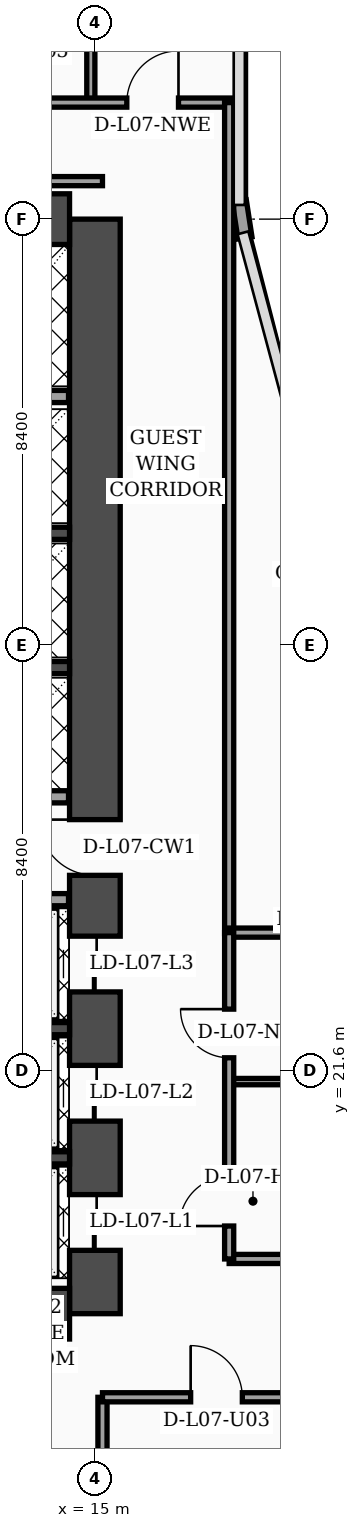
"""IFC4 building model, lengths in metres.
Left out: names, types, materials, properties, quantities, classifications, styles, units other than length and angle.
Written with IfcOpenShell. Run it as: python <this file> out.ifc"""

import sys

from ifc_helpers import new_model, si_unit, direction, frame, frame_2d, origin, place, context, subcontext, project, spatial, rectangle, extrude, element, fill, save


model = new_model("IFC4")
c1 = context("Model", 3, precision=1e-05, world=origin(), true_north=direction((0.0, 1.0)))
c2 = subcontext(c1, "Body", "Model", "MODEL_VIEW")
j1 = project(units=[si_unit("LENGTHUNIT", "METRE"), si_unit("PLANEANGLEUNIT", "RADIAN")], contexts=[c1])
p1 = place(None, origin())
s1 = spatial("IfcSite", under=j1, at=p1, CompositionType="ELEMENT")
p2 = place(p1, origin())
s2 = spatial("IfcBuilding", under=s1, at=p2, CompositionType="ELEMENT")
p3 = place(p2, frame((0.0, 0.0, 34.6)))
s3 = spatial("IfcBuildingStorey", under=s2, at=p3, CompositionType="ELEMENT", Elevation=34.6)
p4 = place(p3, frame((15.0, 16.8, 0.0), z_axis=(0.0, 0.0, 1.0), x_axis=(0.0, 1.0, 0.0)))
e1 = element("IfcWall", 1, at=p4, inside=s3, PredefinedType="SHEAR", context=c2, shape_type="SweptSolid", body=[
    extrude(rectangle(XDim=21.6, YDim=1.0, at=frame_2d((10.8, 0.0))), origin(), (0.0, 0.0, 1.0), 3.56),
])
p5 = place(p4, frame((8.65, 0.0, 0.0)))
e2 = element("IfcOpeningElement", 2, at=p5, cuts=e1, PredefinedType="OPENING", context=c2, shape_type="SweptSolid", body=[
    extrude(rectangle(XDim=1.1, YDim=2.2, at=frame_2d((0.55, 1.1))), frame((0.0, 0.51, 0.0), z_axis=(0.0, -1.0, 0.0), x_axis=(1.0, 0.0, 0.0)), (0.0, 0.0, 1.0), 1.02),
])
p6 = place(p4, frame((1.25, 0.0, 0.0)))
e3 = element("IfcOpeningElement", 3, at=p6, cuts=e1, PredefinedType="OPENING", context=c2, shape_type="SweptSolid", body=[
    extrude(rectangle(XDim=1.1, YDim=2.2, at=frame_2d((0.55, 1.1))), frame((0.0, 0.51, 0.0), z_axis=(0.0, -1.0, 0.0), x_axis=(1.0, 0.0, 0.0)), (0.0, 0.0, 1.0), 1.02),
])
p7 = place(p4, frame((3.8, 0.0, 0.0)))
e4 = element("IfcOpeningElement", 4, at=p7, cuts=e1, PredefinedType="OPENING", context=c2, shape_type="SweptSolid", body=[
    extrude(rectangle(XDim=1.1, YDim=2.2, at=frame_2d((0.55, 1.1))), frame((0.0, 0.51, 0.0), z_axis=(0.0, -1.0, 0.0), x_axis=(1.0, 0.0, 0.0)), (0.0, 0.0, 1.0), 1.02),
])
p8 = place(p4, frame((6.35, 0.0, 0.0)))
e5 = element("IfcOpeningElement", 5, at=p8, cuts=e1, PredefinedType="OPENING", context=c2, shape_type="SweptSolid", body=[
    extrude(rectangle(XDim=1.1, YDim=2.2, at=frame_2d((0.55, 1.1))), frame((0.0, 0.51, 0.0), z_axis=(0.0, -1.0, 0.0), x_axis=(1.0, 0.0, 0.0)), (0.0, 0.0, 1.0), 1.02),
])
for number, where, z_axis, x_axis in (
    (6, (4.7, 38.4, 0.0), (0.0, 0.0, 1.0), (1.0, 0.0, 0.0)),
    (7, (4.7, 16.8, 0.0), (0.0, 0.0, 1.0), (1.0, 0.0, 0.0)),
):
    element("IfcWall", number, at=place(p3, frame(where, z_axis=z_axis, x_axis=x_axis)), inside=s3, PredefinedType="SHEAR", context=c2, shape_type="SweptSolid", body=[
        extrude(rectangle(XDim=9.8, YDim=1.0, at=frame_2d((4.9, 0.0))), origin(), (0.0, 0.0, 1.0), 3.56),
    ])
for number, where, z_axis, x_axis in (
    (8, (12.18, 19.875, 0.0), (0.0, 0.0, 1.0), (1.0, 0.0, 0.0)),
    (9, (12.18, 22.425, 0.0), (0.0, 0.0, 1.0), (1.0, 0.0, 0.0)),
    (10, (12.18, 29.55, 0.0), (0.0, 0.0, 1.0), (1.0, 0.0, 0.0)),
    (11, (12.18, 32.2, 0.0), (0.0, 0.0, 1.0), (1.0, 0.0, 0.0)),
):
    element("IfcWall", number, at=place(p3, frame(where, z_axis=z_axis, x_axis=x_axis)), inside=s3, PredefinedType="SOLIDWALL", context=c2, shape_type="SweptSolid", body=[
        extrude(rectangle(XDim=2.32, YDim=0.24, at=frame_2d((1.16, 0.0))), origin(), (0.0, 0.0, 1.0), 3.56),
    ])
p9 = place(p3, frame((17.962, 38.03, 0.0), z_axis=(0.0, 0.0, 1.0), x_axis=(-0.15141125477, 0.988470855377, 0.0)))
e12 = element("IfcWall", 12, at=p9, inside=s3, PredefinedType="SOLIDWALL", context=c2, shape_type="SweptSolid", body=[
    extrude(rectangle(XDim=0.739, YDim=0.28, at=frame_2d((0.369, 0.0))), origin(), (0.0, 0.0, 1.0), 3.56),
])
p10 = place(p3, frame((12.15, 24.97, 0.0), z_axis=(0.0, 0.0, 1.0), x_axis=(1.0, 0.0, 0.0)))
e13 = element("IfcWall", 13, at=p10, inside=s3, PredefinedType="SOLIDWALL", context=c2, shape_type="SweptSolid", body=[
    extrude(rectangle(XDim=2.33, YDim=0.24, at=frame_2d((1.165, 0.0))), origin(), (0.0, 0.0, 1.0), 2.84),
])
p11 = place(p3, frame((12.25, 27.0, 0.0), z_axis=(0.0, 0.0, 1.0), x_axis=(1.0, 0.0, 0.0)))
e14 = element("IfcWall", 14, at=p11, inside=s3, PredefinedType="SOLIDWALL", context=c2, shape_type="SweptSolid", body=[
    extrude(rectangle(XDim=2.23, YDim=0.24, at=frame_2d((1.115, 0.0))), origin(), (0.0, 0.0, 1.0), 3.56),
])
p12 = place(p3, frame((9.66, 34.9, 0.0), z_axis=(0.0, 0.0, 1.0), x_axis=(1.0, 0.0, 0.0)))
e15 = element("IfcWall", 15, at=p12, inside=s3, PredefinedType="SOLIDWALL", context=c2, shape_type="SweptSolid", body=[
    extrude(rectangle(XDim=4.82, YDim=0.24, at=frame_2d((2.41, 0.0))), origin(), (0.0, 0.0, 1.0), 3.56),
])
p13 = place(p3, frame((15.15, 2.44, 0.0), z_axis=(0.0, 0.0, 1.0), x_axis=(0.0, 1.0, 0.0)))
e16 = element("IfcWall", 16, at=p13, inside=s3, PredefinedType="PARTITIONING", context=c2, shape_type="SweptSolid", body=[
    extrude(rectangle(XDim=12.71, YDim=0.18, at=frame_2d((6.355, 0.0))), origin(), (0.0, 0.0, 1.0), 3.04),
])
p14 = place(p3, frame((15.15, 15.15, 0.0), z_axis=(0.0, 0.0, 1.0), x_axis=(1.0, 0.0, 0.0)))
e17 = element("IfcWall", 17, at=p14, inside=s3, PredefinedType="PARTITIONING", context=c2, shape_type="SweptSolid", body=[
    extrude(rectangle(XDim=6.45, YDim=0.18, at=frame_2d((3.225, 0.0))), origin(), (0.0, 0.0, 1.0), 2.34),
])
p15 = place(p14, frame((1.74, 0.0, 0.0)))
e18 = element("IfcOpeningElement", 18, at=p15, cuts=e17, PredefinedType="OPENING", context=c2, shape_type="SweptSolid", body=[
    extrude(rectangle(XDim=1.02, YDim=2.2, at=frame_2d((0.51, 1.1))), frame((0.0, 0.1, 0.0), z_axis=(0.0, -1.0, 0.0), x_axis=(1.0, 0.0, 0.0)), (0.0, 0.0, 1.0), 0.2),
])
p16 = place(p3, frame((14.92, 40.7, 0.0), z_axis=(0.0, 0.0, 1.0), x_axis=(0.0, 1.0, 0.0)))
e19 = element("IfcWall", 19, at=p16, inside=s3, PredefinedType="PARTITIONING", context=c2, shape_type="SweptSolid", body=[
    extrude(rectangle(XDim=7.1, YDim=0.16, at=frame_2d((3.55, 0.0))), origin(), (0.0, 0.0, 1.0), 3.04),
])
p17 = place(p3, frame((0.08, 40.7, 0.0), z_axis=(0.0, 0.0, 1.0), x_axis=(1.0, 0.0, 0.0)))
e20 = element("IfcWall", 20, at=p17, inside=s3, PredefinedType="PARTITIONING", context=c2, shape_type="SweptSolid", body=[
    extrude(rectangle(XDim=17.77, YDim=0.18, at=frame_2d((8.885, 0.0))), origin(), (0.0, 0.0, 1.0), 2.84),
])
p18 = place(p17, frame((0.9, 0.0, 0.0)))
e21 = element("IfcOpeningElement", 21, at=p18, cuts=e20, PredefinedType="OPENING", context=c2, shape_type="SweptSolid", body=[
    extrude(rectangle(XDim=1.02, YDim=2.2, at=frame_2d((0.51, 1.1))), frame((0.0, 0.1, 0.0), z_axis=(0.0, -1.0, 0.0), x_axis=(1.0, 0.0, 0.0)), (0.0, 0.0, 1.0), 0.2),
])
p19 = place(p17, frame((4.2, 0.0, 0.0)))
e22 = element("IfcOpeningElement", 22, at=p19, cuts=e20, PredefinedType="OPENING", context=c2, shape_type="SweptSolid", body=[
    extrude(rectangle(XDim=1.02, YDim=2.2, at=frame_2d((0.51, 1.1))), frame((0.0, 0.1, 0.0), z_axis=(0.0, -1.0, 0.0), x_axis=(1.0, 0.0, 0.0)), (0.0, 0.0, 1.0), 0.2),
])
p20 = place(p17, frame((10.08, 0.0, 0.0)))
e23 = element("IfcOpeningElement", 23, at=p20, cuts=e20, PredefinedType="OPENING", context=c2, shape_type="SweptSolid", body=[
    extrude(rectangle(XDim=1.02, YDim=2.2, at=frame_2d((0.51, 1.1))), frame((0.0, 0.1, 0.0), z_axis=(0.0, -1.0, 0.0), x_axis=(1.0, 0.0, 0.0)), (0.0, 0.0, 1.0), 0.2),
])
p21 = place(p17, frame((15.55, 0.0, 0.0)))
e24 = element("IfcOpeningElement", 24, at=p21, cuts=e20, PredefinedType="OPENING", context=c2, shape_type="SweptSolid", body=[
    extrude(rectangle(XDim=1.02, YDim=2.2, at=frame_2d((0.51, 1.1))), frame((0.0, 0.1, 0.0), z_axis=(0.0, -1.0, 0.0), x_axis=(1.0, 0.0, 0.0)), (0.0, 0.0, 1.0), 0.2),
])
p22 = place(p3, frame((17.65, 24.3, 0.0), z_axis=(0.0, 0.0, 1.0), x_axis=(0.0, 1.0, 0.0)))
e25 = element("IfcWall", 25, at=p22, inside=s3, PredefinedType="PARTITIONING", context=c2, shape_type="SweptSolid", body=[
    extrude(rectangle(XDim=16.4, YDim=0.18, at=frame_2d((8.2, 0.0))), origin(), (0.0, 0.0, 1.0), 2.84),
])
p23 = place(p3, frame((3.68, 39.15, 0.0), z_axis=(0.0, 0.0, 1.0), x_axis=(1.0, 0.0, 0.0)))
e26 = element("IfcWall", 26, at=p23, inside=s3, PredefinedType="PARTITIONING", context=c2, shape_type="SweptSolid", body=[
    extrude(rectangle(XDim=11.47, YDim=0.18, at=frame_2d((5.735, 0.0))), origin(), (0.0, 0.0, 1.0), 2.84),
])
p24 = place(p3, frame((17.65, 17.88, 0.0), z_axis=(0.0, 0.0, 1.0), x_axis=(1.0, 0.0, 0.0)))
e27 = element("IfcWall", 27, at=p24, inside=s3, PredefinedType="PARTITIONING", context=c2, shape_type="SweptSolid", body=[
    extrude(rectangle(XDim=3.9, YDim=0.18, at=frame_2d((1.95, 0.0))), origin(), (0.0, 0.0, 1.0), 3.09),
])
p25 = place(p3, frame((17.65, 21.38, 0.0), z_axis=(0.0, 0.0, 1.0), x_axis=(1.0, 0.0, 0.0)))
e28 = element("IfcWall", 28, at=p25, inside=s3, PredefinedType="PARTITIONING", context=c2, shape_type="SweptSolid", body=[
    extrude(rectangle(XDim=3.9, YDim=0.125, at=frame_2d((1.95, 0.0))), origin(), (0.0, 0.0, 1.0), 3.56),
])
p26 = place(p3, frame((17.65, 24.32, 0.0), z_axis=(0.0, 0.0, 1.0), x_axis=(1.0, 0.0, 0.0)))
e29 = element("IfcWall", 29, at=p26, inside=s3, PredefinedType="PARTITIONING", context=c2, shape_type="SweptSolid", body=[
    extrude(rectangle(XDim=3.95, YDim=0.18, at=frame_2d((1.975, 0.0))), origin(), (0.0, 0.0, 1.0), 3.56),
])
p27 = place(p3, frame((17.65, 17.88, 0.0), z_axis=(0.0, 0.0, 1.0), x_axis=(0.0, 1.0, 0.0)))
e30 = element("IfcWall", 30, at=p27, inside=s3, PredefinedType="PARTITIONING", context=c2, shape_type="SweptSolid", body=[
    extrude(rectangle(XDim=6.44, YDim=0.18, at=frame_2d((3.22, 0.0))), origin(), (0.0, 0.0, 1.0), 3.09),
])
p28 = place(p27, frame((0.65, 0.0, 0.0)))
e31 = element("IfcOpeningElement", 31, at=p28, cuts=e30, PredefinedType="OPENING", context=c2, shape_type="SweptSolid", body=[
    extrude(rectangle(XDim=0.98, YDim=2.15, at=frame_2d((0.49, 1.075))), frame((0.0, 0.1, 0.0), z_axis=(0.0, -1.0, 0.0), x_axis=(1.0, 0.0, 0.0)), (0.0, 0.0, 1.0), 0.2),
])
p29 = place(p27, frame((3.97, 0.0, 0.0)))
e32 = element("IfcOpeningElement", 32, at=p29, cuts=e30, PredefinedType="OPENING", context=c2, shape_type="SweptSolid", body=[
    extrude(rectangle(XDim=0.96, YDim=2.2, at=frame_2d((0.48, 1.1))), frame((0.0, 0.1, 0.0), z_axis=(0.0, -1.0, 0.0), x_axis=(1.0, 0.0, 0.0)), (0.0, 0.0, 1.0), 0.2),
])
p30 = place(p15, origin())
e33 = element("IfcDoor", 33, at=p30, inside=s3, OperationType="SINGLE_SWING_LEFT", PredefinedType="DOOR", context=c2, shape_type="SweptSolid", body=[
    extrude(rectangle(XDim=1.02, YDim=2.2, at=frame_2d((0.51, 1.1))), frame((0.0, 0.025, 0.0), z_axis=(0.0, -1.0, 0.0), x_axis=(1.0, 0.0, 0.0)), (0.0, 0.0, 1.0), 0.05),
])
fill(e18, e33)
p31 = place(p21, origin())
e34 = element("IfcDoor", 34, at=p31, inside=s3, OperationType="SINGLE_SWING_RIGHT", PredefinedType="DOOR", context=c2, shape_type="SweptSolid", body=[
    extrude(rectangle(XDim=1.02, YDim=2.2, at=frame_2d((0.51, 1.1))), frame((0.0, 0.025, 0.0), z_axis=(0.0, -1.0, 0.0), x_axis=(1.0, 0.0, 0.0)), (0.0, 0.0, 1.0), 0.05),
])
fill(e24, e34)
p32 = place(p28, origin())
e35 = element("IfcDoor", 35, at=p32, inside=s3, OperationType="SINGLE_SWING_LEFT", PredefinedType="DOOR", context=c2, shape_type="SweptSolid", body=[
    extrude(rectangle(XDim=0.98, YDim=2.15, at=frame_2d((0.49, 1.075))), frame((0.0, 0.025, 0.0), z_axis=(0.0, -1.0, 0.0), x_axis=(1.0, 0.0, 0.0)), (0.0, 0.0, 1.0), 0.05),
])
fill(e31, e35)
p33 = place(p29, origin())
e36 = element("IfcDoor", 36, at=p33, inside=s3, OperationType="SINGLE_SWING_RIGHT", PredefinedType="DOOR", context=c2, shape_type="SweptSolid", body=[
    extrude(rectangle(XDim=0.96, YDim=2.2, at=frame_2d((0.48, 1.1))), frame((0.0, 0.025, 0.0), z_axis=(0.0, -1.0, 0.0), x_axis=(1.0, 0.0, 0.0)), (0.0, 0.0, 1.0), 0.05),
])
fill(e32, e36)
p34 = place(p5, origin())
e37 = element("IfcDoor", 37, at=p34, inside=s3, OperationType="SINGLE_SWING_RIGHT", PredefinedType="DOOR", context=c2, shape_type="SweptSolid", body=[
    extrude(rectangle(XDim=1.1, YDim=2.2, at=frame_2d((0.55, 1.1))), frame((0.0, 0.025, 0.0), z_axis=(0.0, -1.0, 0.0), x_axis=(1.0, 0.0, 0.0)), (0.0, 0.0, 1.0), 0.05),
])
fill(e2, e37)
p35 = place(p6, origin())
e38 = element("IfcDoor", 38, at=p35, inside=s3, OperationType="DOUBLE_DOOR_SLIDING", PredefinedType="DOOR", context=c2, shape_type="SweptSolid", body=[
    extrude(rectangle(XDim=1.1, YDim=2.2, at=frame_2d((0.55, 1.1))), frame((0.0, 0.025, 0.0), z_axis=(0.0, -1.0, 0.0), x_axis=(1.0, 0.0, 0.0)), (0.0, 0.0, 1.0), 0.05),
])
fill(e3, e38)
p36 = place(p7, origin())
e39 = element("IfcDoor", 39, at=p36, inside=s3, OperationType="DOUBLE_DOOR_SLIDING", PredefinedType="DOOR", context=c2, shape_type="SweptSolid", body=[
    extrude(rectangle(XDim=1.1, YDim=2.2, at=frame_2d((0.55, 1.1))), frame((0.0, 0.025, 0.0), z_axis=(0.0, -1.0, 0.0), x_axis=(1.0, 0.0, 0.0)), (0.0, 0.0, 1.0), 0.05),
])
fill(e4, e39)
p37 = place(p8, origin())
e40 = element("IfcDoor", 40, at=p37, inside=s3, OperationType="DOUBLE_DOOR_SLIDING", PredefinedType="DOOR", context=c2, shape_type="SweptSolid", body=[
    extrude(rectangle(XDim=1.1, YDim=2.2, at=frame_2d((0.55, 1.1))), frame((0.0, 0.025, 0.0), z_axis=(0.0, -1.0, 0.0), x_axis=(1.0, 0.0, 0.0)), (0.0, 0.0, 1.0), 0.05),
])
fill(e5, e40)
save(model, sys.argv[1])
